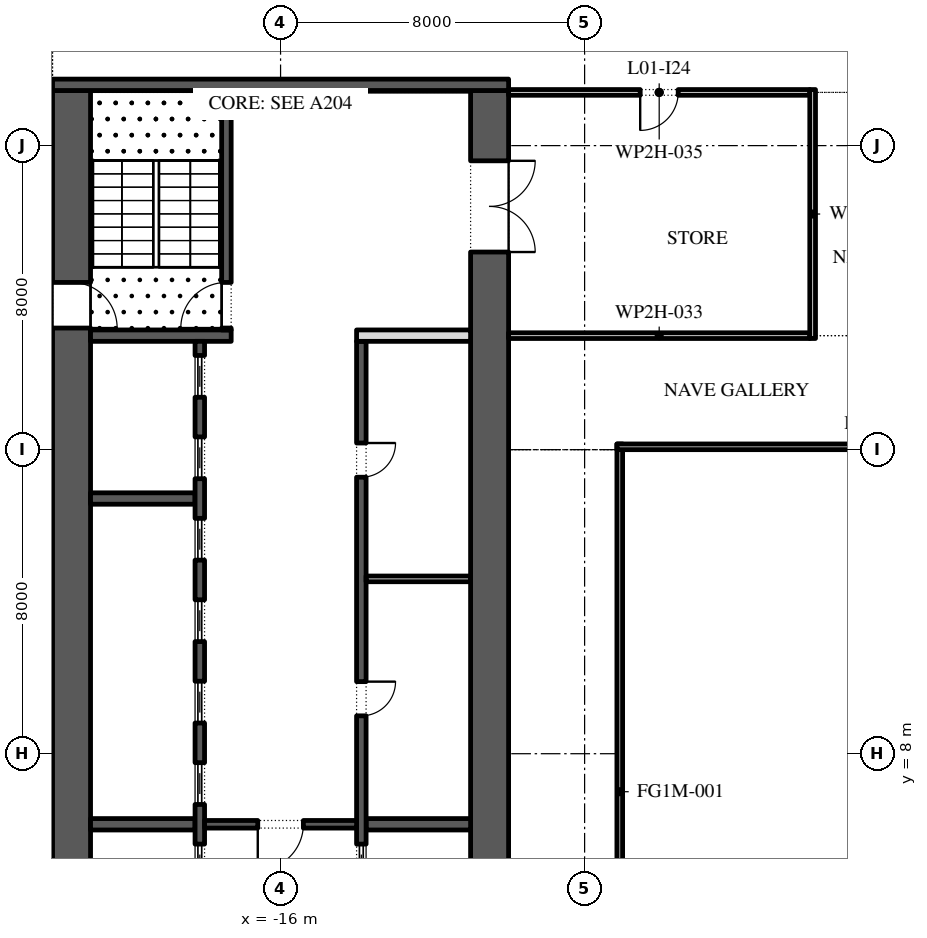
"""IFC4 building model, lengths in metres.
Left out: names, types, materials, properties, quantities, classifications, styles, units other than length and angle.
Written with IfcOpenShell. Run it as: python <this file> out.ifc"""

import sys

from ifc_helpers import new_model, si_unit, direction, frame, frame_2d, origin, place, context, subcontext, project, spatial, rectangle, extrude, element, fill, save


model = new_model("IFC4")
c1 = context("Model", 3, precision=1e-05, world=origin(), true_north=direction((0.0, 1.0)))
c2 = subcontext(c1, "Body", "Model", "MODEL_VIEW")
j1 = project(units=[si_unit("LENGTHUNIT", "METRE"), si_unit("PLANEANGLEUNIT", "RADIAN")], contexts=[c1])
p1 = place(None, origin())
s1 = spatial("IfcSite", under=j1, at=p1, CompositionType="ELEMENT")
p2 = place(p1, origin())
s2 = spatial("IfcBuilding", under=s1, at=p2, CompositionType="ELEMENT")
p3 = place(p2, frame((0.0, 0.0, 8.0)))
s3 = spatial("IfcBuildingStorey", under=s2, at=p3, CompositionType="ELEMENT", Elevation=8.0)
p4 = place(p3, frame((-7.075, -2.15, 0.0), z_axis=(0.0, 0.0, 1.0), x_axis=(0.0, 1.0, 0.0)))
e1 = element("IfcWall", 1, at=p4, inside=s3, PredefinedType="STANDARD", context=c2, shape_type="SweptSolid", body=[
    extrude(rectangle(XDim=18.3, YDim=0.15, at=frame_2d((9.15, 0.0))), origin(), (0.0, 0.0, 1.0), 5.7),
])
p5 = place(p3, frame((-7.15, 16.075, 0.0), z_axis=(0.0, 0.0, 1.0), x_axis=(1.0, 0.0, 0.0)))
e2 = element("IfcWall", 2, at=p5, inside=s3, PredefinedType="STANDARD", context=c2, shape_type="SweptSolid", body=[
    extrude(rectangle(XDim=14.15, YDim=0.15, at=frame_2d((7.075, 0.0))), origin(), (0.0, 0.0, 1.0), 4.72),
])
p6 = place(p3, frame((-21.5, -2.45, 0.0), z_axis=(0.0, 0.0, 1.0), x_axis=(0.0, 1.0, 0.0)))
e3 = element("IfcWall", 3, at=p6, inside=s3, PredefinedType="SHEAR", context=c2, shape_type="SweptSolid", body=[
    extrude(rectangle(XDim=27.9, YDim=1.0, at=frame_2d((13.95, 0.0))), origin(), (0.0, 0.0, 1.0), 5.7),
])
p7 = place(p6, frame((5.05, 0.0, 0.0)))
e4 = element("IfcOpeningElement", 4, at=p7, cuts=e3, PredefinedType="OPENING", context=c2, shape_type="SweptSolid", body=[
    extrude(rectangle(XDim=1.2, YDim=2.1, at=frame_2d((0.6, 1.05))), frame((0.0, 0.51, 0.0), z_axis=(0.0, -1.0, 0.0), x_axis=(1.0, 0.0, 0.0)), (0.0, 0.0, 1.0), 1.02),
])
p8 = place(p6, frame((21.65, 0.0, 0.0)))
e5 = element("IfcOpeningElement", 5, at=p8, cuts=e3, PredefinedType="OPENING", context=c2, shape_type="SweptSolid", body=[
    extrude(rectangle(XDim=1.2, YDim=2.1, at=frame_2d((0.6, 1.05))), frame((0.0, 0.51, 0.0), z_axis=(0.0, -1.0, 0.0), x_axis=(1.0, 0.0, 0.0)), (0.0, 0.0, 1.0), 1.02),
])
p9 = place(p3, frame((-10.5, -2.45, 0.0), z_axis=(0.0, 0.0, 1.0), x_axis=(0.0, 1.0, 0.0)))
e6 = element("IfcWall", 6, at=p9, inside=s3, PredefinedType="SHEAR", context=c2, shape_type="SweptSolid", body=[
    extrude(rectangle(XDim=27.9, YDim=1.0, at=frame_2d((13.95, 0.0))), origin(), (0.0, 0.0, 1.0), 5.7),
])
p10 = place(p9, frame((23.65, 0.0, 0.0)))
e7 = element("IfcOpeningElement", 7, at=p10, cuts=e6, PredefinedType="OPENING", context=c2, shape_type="SweptSolid", body=[
    extrude(rectangle(XDim=2.4, YDim=2.1, at=frame_2d((1.2, 1.05))), frame((0.0, 0.51, 0.0), z_axis=(0.0, -1.0, 0.0), x_axis=(1.0, 0.0, 0.0)), (0.0, 0.0, 1.0), 1.02),
])
p11 = place(p9, frame((1.387, 0.0, 0.0)))
e8 = element("IfcOpeningElement", 8, at=p11, cuts=e6, PredefinedType="OPENING", context=c2, shape_type="SweptSolid", body=[
    extrude(rectangle(XDim=0.9, YDim=2.1, at=frame_2d((0.45, 1.05))), frame((0.0, 0.51, 0.0), z_axis=(0.0, -1.0, 0.0), x_axis=(1.0, 0.0, 0.0)), (0.0, 0.0, 1.0), 1.02),
])
p12 = place(p9, frame((4.613, 0.0, 0.0)))
e9 = element("IfcOpeningElement", 9, at=p12, cuts=e6, PredefinedType="OPENING", context=c2, shape_type="SweptSolid", body=[
    extrude(rectangle(XDim=0.9, YDim=2.1, at=frame_2d((0.45, 1.05))), frame((0.0, 0.51, 0.0), z_axis=(0.0, -1.0, 0.0), x_axis=(1.0, 0.0, 0.0)), (0.0, 0.0, 1.0), 1.02),
])
p13 = place(p3, frame((-22.0, 25.6, 0.0), z_axis=(0.0, 0.0, 1.0), x_axis=(1.0, 0.0, 0.0)))
e10 = element("IfcWall", 10, at=p13, inside=s3, PredefinedType="SHEAR", context=c2, shape_type="SweptSolid", body=[
    extrude(rectangle(XDim=12.0, YDim=0.3, at=frame_2d((6.0, 0.0))), origin(), (0.0, 0.0, 1.0), 5.7),
])
p14 = place(p3, frame((-21.0, 19.0, 0.0), z_axis=(0.0, 0.0, 1.0), x_axis=(1.0, 0.0, 0.0)))
e11 = element("IfcWall", 11, at=p14, inside=s3, PredefinedType="SHEAR", context=c2, shape_type="SweptSolid", body=[
    extrude(rectangle(XDim=3.7, YDim=0.3, at=frame_2d((1.85, 0.0))), origin(), (0.0, 0.0, 1.0), 5.7),
])
p15 = place(p3, frame((-17.425, 19.15, 0.0), z_axis=(0.0, 0.0, 1.0), x_axis=(0.0, 1.0, 0.0)))
e12 = element("IfcWall", 12, at=p15, inside=s3, PredefinedType="SHEAR", context=c2, shape_type="SweptSolid", body=[
    extrude(rectangle(XDim=6.3, YDim=0.25, at=frame_2d((3.15, 0.0))), origin(), (0.0, 0.0, 1.0), 5.7),
])
p16 = place(p15, frame((0.05, 0.0, 0.0)))
e13 = element("IfcOpeningElement", 13, at=p16, cuts=e12, PredefinedType="OPENING", context=c2, shape_type="SweptSolid", body=[
    extrude(rectangle(XDim=1.2, YDim=2.1, at=frame_2d((0.6, 1.05))), frame((0.0, 0.135, 0.0), z_axis=(0.0, -1.0, 0.0), x_axis=(1.0, 0.0, 0.0)), (0.0, 0.0, 1.0), 0.27),
])
for number, where, z_axis, x_axis in (
    (14, (-21.0, 6.143, 0.0), (0.0, 0.0, 1.0), (1.0, 0.0, 0.0)),
    (15, (-21.0, 14.714, 0.0), (0.0, 0.0, 1.0), (1.0, 0.0, 0.0)),
):
    element("IfcWall", number, at=place(p3, frame(where, z_axis=z_axis, x_axis=x_axis)), inside=s3, PredefinedType="SHEAR", context=c2, shape_type="SweptSolid", body=[
        extrude(rectangle(XDim=2.75, YDim=0.3, at=frame_2d((1.375, 0.0))), origin(), (0.0, 0.0, 1.0), 5.7),
    ])
p17 = place(p3, frame((-18.125, 4.15, 0.0), z_axis=(0.0, 0.0, 1.0), x_axis=(0.0, 1.0, 0.0)))
e16 = element("IfcWall", 16, at=p17, inside=s3, PredefinedType="SHEAR", context=c2, shape_type="SweptSolid", body=[
    extrude(rectangle(XDim=14.7, YDim=0.25, at=frame_2d((7.35, 0.0))), origin(), (0.0, 0.0, 1.0), 5.7),
])
p18 = place(p17, frame((0.371, 0.0, 0.0)))
e17 = element("IfcOpeningElement", 17, at=p18, cuts=e16, PredefinedType="OPENING", context=c2, shape_type="SweptSolid", body=[
    extrude(rectangle(XDim=1.1, YDim=2.1, at=frame_2d((0.55, 1.05))), frame((0.0, 0.135, 0.0), z_axis=(0.0, -1.0, 0.0), x_axis=(1.0, 0.0, 0.0)), (0.0, 0.0, 1.0), 0.27),
])
p19 = place(p17, frame((2.514, 0.0, 0.0)))
e18 = element("IfcOpeningElement", 18, at=p19, cuts=e16, PredefinedType="OPENING", context=c2, shape_type="SweptSolid", body=[
    extrude(rectangle(XDim=1.1, YDim=2.1, at=frame_2d((0.55, 1.05))), frame((0.0, 0.135, 0.0), z_axis=(0.0, -1.0, 0.0), x_axis=(1.0, 0.0, 0.0)), (0.0, 0.0, 1.0), 0.27),
])
p20 = place(p17, frame((4.657, 0.0, 0.0)))
e19 = element("IfcOpeningElement", 19, at=p20, cuts=e16, PredefinedType="OPENING", context=c2, shape_type="SweptSolid", body=[
    extrude(rectangle(XDim=1.1, YDim=2.1, at=frame_2d((0.55, 1.05))), frame((0.0, 0.135, 0.0), z_axis=(0.0, -1.0, 0.0), x_axis=(1.0, 0.0, 0.0)), (0.0, 0.0, 1.0), 0.27),
])
p21 = place(p17, frame((6.8, 0.0, 0.0)))
e20 = element("IfcOpeningElement", 20, at=p21, cuts=e16, PredefinedType="OPENING", context=c2, shape_type="SweptSolid", body=[
    extrude(rectangle(XDim=1.1, YDim=2.1, at=frame_2d((0.55, 1.05))), frame((0.0, 0.135, 0.0), z_axis=(0.0, -1.0, 0.0), x_axis=(1.0, 0.0, 0.0)), (0.0, 0.0, 1.0), 0.27),
])
p22 = place(p17, frame((8.943, 0.0, 0.0)))
e21 = element("IfcOpeningElement", 21, at=p22, cuts=e16, PredefinedType="OPENING", context=c2, shape_type="SweptSolid", body=[
    extrude(rectangle(XDim=1.1, YDim=2.1, at=frame_2d((0.55, 1.05))), frame((0.0, 0.135, 0.0), z_axis=(0.0, -1.0, 0.0), x_axis=(1.0, 0.0, 0.0)), (0.0, 0.0, 1.0), 0.27),
])
p23 = place(p17, frame((11.086, 0.0, 0.0)))
e22 = element("IfcOpeningElement", 22, at=p23, cuts=e16, PredefinedType="OPENING", context=c2, shape_type="SweptSolid", body=[
    extrude(rectangle(XDim=1.1, YDim=2.1, at=frame_2d((0.55, 1.05))), frame((0.0, 0.135, 0.0), z_axis=(0.0, -1.0, 0.0), x_axis=(1.0, 0.0, 0.0)), (0.0, 0.0, 1.0), 0.27),
])
p24 = place(p17, frame((13.229, 0.0, 0.0)))
e23 = element("IfcOpeningElement", 23, at=p24, cuts=e16, PredefinedType="OPENING", context=c2, shape_type="SweptSolid", body=[
    extrude(rectangle(XDim=1.1, YDim=2.1, at=frame_2d((0.55, 1.05))), frame((0.0, 0.135, 0.0), z_axis=(0.0, -1.0, 0.0), x_axis=(1.0, 0.0, 0.0)), (0.0, 0.0, 1.0), 0.27),
])
p25 = place(p3, frame((-13.75, 6.143, 0.0), z_axis=(0.0, 0.0, 1.0), x_axis=(1.0, 0.0, 0.0)))
e24 = element("IfcWall", 24, at=p25, inside=s3, PredefinedType="SHEAR", context=c2, shape_type="SweptSolid", body=[
    extrude(rectangle(XDim=2.75, YDim=0.3, at=frame_2d((1.375, 0.0))), origin(), (0.0, 0.0, 1.0), 5.7),
])
p26 = place(p3, frame((-13.875, -2.45, 0.0), z_axis=(0.0, 0.0, 1.0), x_axis=(0.0, 1.0, 0.0)))
e25 = element("IfcWall", 25, at=p26, inside=s3, PredefinedType="SHEAR", context=c2, shape_type="SweptSolid", body=[
    extrude(rectangle(XDim=21.3, YDim=0.25, at=frame_2d((10.65, 0.0))), origin(), (0.0, 0.0, 1.0), 5.7),
])
p27 = place(p26, frame((11.446, 0.0, 0.0)))
e26 = element("IfcOpeningElement", 26, at=p27, cuts=e25, PredefinedType="OPENING", context=c2, shape_type="SweptSolid", body=[
    extrude(rectangle(XDim=0.9, YDim=2.1, at=frame_2d((0.45, 1.05))), frame((0.0, 0.135, 0.0), z_axis=(0.0, -1.0, 0.0), x_axis=(1.0, 0.0, 0.0)), (0.0, 0.0, 1.0), 0.27),
])
p28 = place(p26, frame((17.725, 0.0, 0.0)))
e27 = element("IfcOpeningElement", 27, at=p28, cuts=e25, PredefinedType="OPENING", context=c2, shape_type="SweptSolid", body=[
    extrude(rectangle(XDim=0.9, YDim=2.1, at=frame_2d((0.45, 1.05))), frame((0.0, 0.135, 0.0), z_axis=(0.0, -1.0, 0.0), x_axis=(1.0, 0.0, 0.0)), (0.0, 0.0, 1.0), 0.27),
])
p29 = place(p26, frame((6.971, 0.0, 0.0)))
e28 = element("IfcOpeningElement", 28, at=p29, cuts=e25, PredefinedType="OPENING", context=c2, shape_type="SweptSolid", body=[
    extrude(rectangle(XDim=1.1, YDim=2.1, at=frame_2d((0.55, 1.05))), frame((0.0, 0.135, 0.0), z_axis=(0.0, -1.0, 0.0), x_axis=(1.0, 0.0, 0.0)), (0.0, 0.0, 1.0), 0.27),
])
p30 = place(p3, frame((-14.0, 19.0, 0.0), z_axis=(0.0, 0.0, 1.0), x_axis=(1.0, 0.0, 0.0)))
e29 = element("IfcWall", 29, at=p30, inside=s3, PredefinedType="PARTITIONING", context=c2, shape_type="SweptSolid", body=[
    extrude(rectangle(XDim=3.0, YDim=0.3, at=frame_2d((1.5, 0.0))), origin(), (0.0, 0.0, 1.0), 5.7),
])
p31 = place(p3, frame((-13.75, 12.6, 0.0), z_axis=(0.0, 0.0, 1.0), x_axis=(1.0, 0.0, 0.0)))
e30 = element("IfcWall", 30, at=p31, inside=s3, PredefinedType="PARTITIONING", context=c2, shape_type="SweptSolid", body=[
    extrude(rectangle(XDim=2.75, YDim=0.15, at=frame_2d((1.375, 0.0))), origin(), (0.0, 0.0, 1.0), 5.7),
])
p32 = place(p3, frame((-18.0, 6.143, 0.0), z_axis=(0.0, 0.0, 1.0), x_axis=(1.0, 0.0, 0.0)))
e31 = element("IfcWall", 31, at=p32, inside=s3, PredefinedType="SHEAR", context=c2, shape_type="SweptSolid", body=[
    extrude(rectangle(XDim=4.0, YDim=0.2, at=frame_2d((2.0, 0.0))), origin(), (0.0, 0.0, 1.0), 5.7),
])
p33 = place(p32, frame((1.4, 0.0, 0.0)))
e32 = element("IfcOpeningElement", 32, at=p33, cuts=e31, PredefinedType="OPENING", context=c2, shape_type="SweptSolid", body=[
    extrude(rectangle(XDim=1.2, YDim=2.1, at=frame_2d((0.6, 1.05))), frame((0.0, 0.11, 0.0), z_axis=(0.0, -1.0, 0.0), x_axis=(1.0, 0.0, 0.0)), (0.0, 0.0, 1.0), 0.22),
])
p34 = place(p3, frame((-10.0, 19.0, 0.0), z_axis=(0.0, 0.0, 1.0), x_axis=(1.0, 0.0, 0.0)))
e33 = element("IfcWall", 33, at=p34, inside=s3, PredefinedType="PARTITIONING", context=c2, shape_type="SweptSolid", body=[
    extrude(rectangle(XDim=7.925, YDim=0.15, at=frame_2d((3.962, 0.0))), origin(), (0.0, 0.0, 1.0), 5.7),
])
p35 = place(p3, frame((-10.0, 25.4, 0.0), z_axis=(0.0, 0.0, 1.0), x_axis=(1.0, 0.0, 0.0)))
e34 = element("IfcWall", 34, at=p35, inside=s3, PredefinedType="PARTITIONING", context=c2, shape_type="SweptSolid", body=[
    extrude(rectangle(XDim=7.925, YDim=0.15, at=frame_2d((3.962, 0.0))), origin(), (0.0, 0.0, 1.0), 5.7),
])
p36 = place(p35, frame((3.462, 0.0, 0.0)))
e35 = element("IfcOpeningElement", 35, at=p36, cuts=e34, PredefinedType="OPENING", context=c2, shape_type="SweptSolid", body=[
    extrude(rectangle(XDim=1.0, YDim=2.1, at=frame_2d((0.5, 1.05))), frame((0.0, 0.085, 0.0), z_axis=(0.0, -1.0, 0.0), x_axis=(1.0, 0.0, 0.0)), (0.0, 0.0, 1.0), 0.17),
])
p37 = place(p3, frame((-2.0, 18.925, 0.0), z_axis=(0.0, 0.0, 1.0), x_axis=(0.0, 1.0, 0.0)))
e36 = element("IfcWall", 36, at=p37, inside=s3, PredefinedType="PARTITIONING", context=c2, shape_type="SweptSolid", body=[
    extrude(rectangle(XDim=6.55, YDim=0.15, at=frame_2d((3.275, 0.0))), origin(), (0.0, 0.0, 1.0), 5.7),
])
p38 = place(p18, origin())
e37 = element("IfcDoor", 37, at=p38, inside=s3, OperationType="SLIDING_TO_LEFT", PredefinedType="DOOR", context=c2, shape_type="SweptSolid", body=[
    extrude(rectangle(XDim=1.1, YDim=2.1, at=frame_2d((0.55, 1.05))), frame((0.0, 0.025, 0.0), z_axis=(0.0, -1.0, 0.0), x_axis=(1.0, 0.0, 0.0)), (0.0, 0.0, 1.0), 0.05),
])
fill(e17, e37)
p39 = place(p19, origin())
e38 = element("IfcDoor", 38, at=p39, inside=s3, OperationType="SLIDING_TO_LEFT", PredefinedType="DOOR", context=c2, shape_type="SweptSolid", body=[
    extrude(rectangle(XDim=1.1, YDim=2.1, at=frame_2d((0.55, 1.05))), frame((0.0, 0.025, 0.0), z_axis=(0.0, -1.0, 0.0), x_axis=(1.0, 0.0, 0.0)), (0.0, 0.0, 1.0), 0.05),
])
fill(e18, e38)
p40 = place(p20, origin())
e39 = element("IfcDoor", 39, at=p40, inside=s3, OperationType="SLIDING_TO_LEFT", PredefinedType="DOOR", context=c2, shape_type="SweptSolid", body=[
    extrude(rectangle(XDim=1.1, YDim=2.1, at=frame_2d((0.55, 1.05))), frame((0.0, 0.025, 0.0), z_axis=(0.0, -1.0, 0.0), x_axis=(1.0, 0.0, 0.0)), (0.0, 0.0, 1.0), 0.05),
])
fill(e19, e39)
p41 = place(p21, origin())
e40 = element("IfcDoor", 40, at=p41, inside=s3, OperationType="SLIDING_TO_LEFT", PredefinedType="DOOR", context=c2, shape_type="SweptSolid", body=[
    extrude(rectangle(XDim=1.1, YDim=2.1, at=frame_2d((0.55, 1.05))), frame((0.0, 0.025, 0.0), z_axis=(0.0, -1.0, 0.0), x_axis=(1.0, 0.0, 0.0)), (0.0, 0.0, 1.0), 0.05),
])
fill(e20, e40)
p42 = place(p22, origin())
e41 = element("IfcDoor", 41, at=p42, inside=s3, OperationType="SLIDING_TO_LEFT", PredefinedType="DOOR", context=c2, shape_type="SweptSolid", body=[
    extrude(rectangle(XDim=1.1, YDim=2.1, at=frame_2d((0.55, 1.05))), frame((0.0, 0.025, 0.0), z_axis=(0.0, -1.0, 0.0), x_axis=(1.0, 0.0, 0.0)), (0.0, 0.0, 1.0), 0.05),
])
fill(e21, e41)
p43 = place(p23, origin())
e42 = element("IfcDoor", 42, at=p43, inside=s3, OperationType="SLIDING_TO_LEFT", PredefinedType="DOOR", context=c2, shape_type="SweptSolid", body=[
    extrude(rectangle(XDim=1.1, YDim=2.1, at=frame_2d((0.55, 1.05))), frame((0.0, 0.025, 0.0), z_axis=(0.0, -1.0, 0.0), x_axis=(1.0, 0.0, 0.0)), (0.0, 0.0, 1.0), 0.05),
])
fill(e22, e42)
p44 = place(p24, origin())
e43 = element("IfcDoor", 43, at=p44, inside=s3, OperationType="SLIDING_TO_LEFT", PredefinedType="DOOR", context=c2, shape_type="SweptSolid", body=[
    extrude(rectangle(XDim=1.1, YDim=2.1, at=frame_2d((0.55, 1.05))), frame((0.0, 0.025, 0.0), z_axis=(0.0, -1.0, 0.0), x_axis=(1.0, 0.0, 0.0)), (0.0, 0.0, 1.0), 0.05),
])
fill(e23, e43)
p45 = place(p27, frame((0.9, -0.2, 0.0), z_axis=(0.0, 0.0, 1.0), x_axis=(-1.0, 0.0, 0.0)))
e44 = element("IfcDoor", 44, at=p45, inside=s3, OperationType="SINGLE_SWING_RIGHT", PredefinedType="DOOR", context=c2, shape_type="SweptSolid", body=[
    extrude(rectangle(XDim=0.9, YDim=2.1, at=frame_2d((0.45, 1.05))), frame((0.0, -0.075, 0.0), z_axis=(0.0, -1.0, 0.0), x_axis=(1.0, 0.0, 0.0)), (0.0, 0.0, 1.0), 0.05),
])
fill(e26, e44)
p46 = place(p28, frame((0.9, -0.2, 0.0), z_axis=(0.0, 0.0, 1.0), x_axis=(-1.0, 0.0, 0.0)))
e45 = element("IfcDoor", 45, at=p46, inside=s3, OperationType="SINGLE_SWING_RIGHT", PredefinedType="DOOR", context=c2, shape_type="SweptSolid", body=[
    extrude(rectangle(XDim=0.9, YDim=2.1, at=frame_2d((0.45, 1.05))), frame((0.0, -0.075, 0.0), z_axis=(0.0, -1.0, 0.0), x_axis=(1.0, 0.0, 0.0)), (0.0, 0.0, 1.0), 0.05),
])
fill(e27, e45)
p47 = place(p29, origin())
e46 = element("IfcDoor", 46, at=p47, inside=s3, OperationType="SLIDING_TO_LEFT", PredefinedType="DOOR", context=c2, shape_type="SweptSolid", body=[
    extrude(rectangle(XDim=1.1, YDim=2.1, at=frame_2d((0.55, 1.05))), frame((0.0, 0.025, 0.0), z_axis=(0.0, -1.0, 0.0), x_axis=(1.0, 0.0, 0.0)), (0.0, 0.0, 1.0), 0.05),
])
fill(e28, e46)
p48 = place(p33, frame((1.2, 0.0, 0.0), z_axis=(0.0, 0.0, 1.0), x_axis=(-1.0, 0.0, 0.0)))
e47 = element("IfcDoor", 47, at=p48, inside=s3, OperationType="SINGLE_SWING_LEFT", PredefinedType="DOOR", context=c2, shape_type="SweptSolid", body=[
    extrude(rectangle(XDim=1.2, YDim=2.1, at=frame_2d((0.6, 1.05))), frame((0.0, 0.025, 0.0), z_axis=(0.0, -1.0, 0.0), x_axis=(1.0, 0.0, 0.0)), (0.0, 0.0, 1.0), 0.05),
])
fill(e32, e47)
p49 = place(p10, frame((2.4, 0.0, 0.0), z_axis=(0.0, 0.0, 1.0), x_axis=(-1.0, 0.0, 0.0)))
e48 = element("IfcDoor", 48, at=p49, inside=s3, OperationType="DOUBLE_DOOR_SINGLE_SWING", PredefinedType="DOOR", context=c2, shape_type="SweptSolid", body=[
    extrude(rectangle(XDim=2.4, YDim=2.1, at=frame_2d((1.2, 1.05))), frame((0.0, 0.025, 0.0), z_axis=(0.0, -1.0, 0.0), x_axis=(1.0, 0.0, 0.0)), (0.0, 0.0, 1.0), 0.05),
])
fill(e7, e48)
p50 = place(p16, origin())
e49 = element("IfcDoor", 49, at=p50, inside=s3, OperationType="SINGLE_SWING_RIGHT", PredefinedType="DOOR", context=c2, shape_type="SweptSolid", body=[
    extrude(rectangle(XDim=1.2, YDim=2.1, at=frame_2d((0.6, 1.05))), frame((0.0, 0.025, 0.0), z_axis=(0.0, -1.0, 0.0), x_axis=(1.0, 0.0, 0.0)), (0.0, 0.0, 1.0), 0.05),
])
fill(e13, e49)
p51 = place(p8, frame((1.2, 0.0, 0.0), z_axis=(0.0, 0.0, 1.0), x_axis=(-1.0, 0.0, 0.0)))
e50 = element("IfcDoor", 50, at=p51, inside=s3, OperationType="SINGLE_SWING_LEFT", PredefinedType="DOOR", context=c2, shape_type="SweptSolid", body=[
    extrude(rectangle(XDim=1.2, YDim=2.1, at=frame_2d((0.6, 1.05))), frame((0.0, 0.025, 0.0), z_axis=(0.0, -1.0, 0.0), x_axis=(1.0, 0.0, 0.0)), (0.0, 0.0, 1.0), 0.05),
])
fill(e5, e50)
p52 = place(p36, frame((1.0, 0.0, 0.0), z_axis=(0.0, 0.0, 1.0), x_axis=(-1.0, 0.0, 0.0)))
e51 = element("IfcDoor", 51, at=p52, inside=s3, OperationType="SINGLE_SWING_LEFT", PredefinedType="DOOR", context=c2, shape_type="SweptSolid", body=[
    extrude(rectangle(XDim=1.0, YDim=2.1, at=frame_2d((0.5, 1.05))), frame((0.0, 0.025, 0.0), z_axis=(0.0, -1.0, 0.0), x_axis=(1.0, 0.0, 0.0)), (0.0, 0.0, 1.0), 0.05),
])
fill(e35, e51)
save(model, sys.argv[1])
